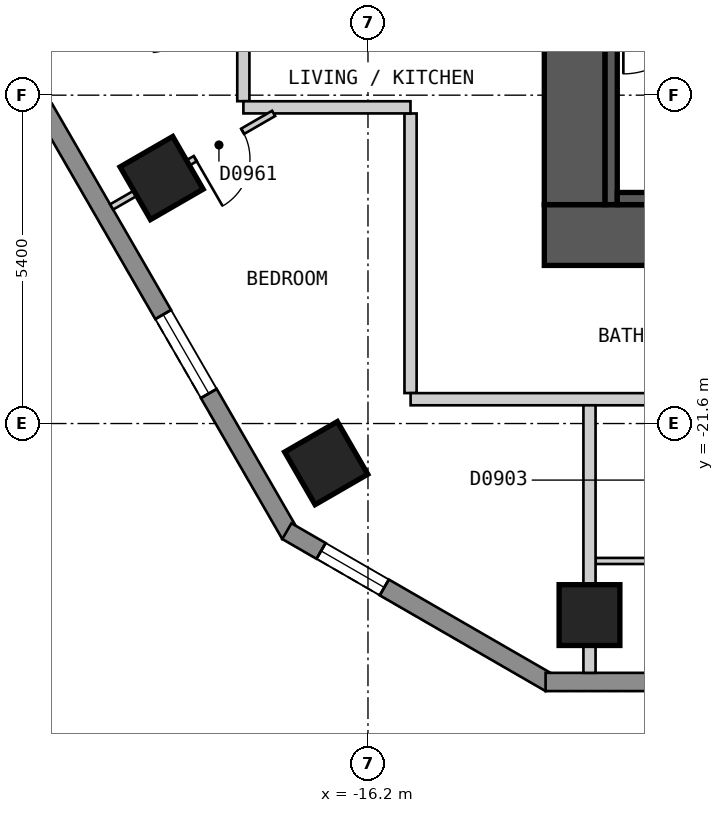
"""IFC4 building model, lengths in metres.
Left out: names, types, materials, properties, quantities, classifications, styles, units other than length and angle.
Written with IfcOpenShell. Run it as: python <this file> out.ifc"""

import sys

from ifc_helpers import new_model, si_unit, direction, frame, frame_2d, origin, origin_2d, place, context, subcontext, project, spatial, polyline, rectangle, outline, extrude, element, fill, save


model = new_model("IFC4")
c1 = context("Model", 3, precision=1e-05, world=origin(), true_north=direction((0.0, 1.0)))
c2 = subcontext(c1, "Body", "Model", "MODEL_VIEW")
j1 = project(units=[si_unit("LENGTHUNIT", "METRE"), si_unit("PLANEANGLEUNIT", "RADIAN")], contexts=[c1])
p1 = place(None, origin())
s1 = spatial("IfcSite", under=j1, at=p1, CompositionType="ELEMENT")
p2 = place(p1, origin())
s2 = spatial("IfcBuilding", under=s1, at=p2, CompositionType="ELEMENT")
p3 = place(p2, frame((0.0, 0.0, 102.0)))
s3 = spatial("IfcBuildingStorey", under=s2, at=p3, CompositionType="ELEMENT", Elevation=102.0)
for number, where, z_axis, x_axis in (
    (1, (-19.594, -17.563, 0.0), (0.0, 0.0, 1.0), (0.5, -0.866, 0.0)),
    (2, (-16.887, -22.251, 0.0), (0.0, 0.0, 1.0), (0.5, -0.866, 0.0)),
    (3, (-12.557, -24.75, 0.0), (0.0, 0.0, 1.0), (1.0, 0.0, 0.0)),
):
    element("IfcColumn", number, at=place(p3, frame(where, z_axis=z_axis, x_axis=x_axis)), inside=s3, PredefinedType="COLUMN", context=c2, shape_type="SweptSolid", body=[
        extrude(rectangle(XDim=1.0, YDim=1.0, at=origin_2d()), origin(), (0.0, 0.0, 1.0), 3.0),
    ])
p4 = place(p3, frame((-13.3, -18.5, 0.0), z_axis=(0.0, 0.0, 1.0), x_axis=(1.0, 0.0, 0.0)))
e4 = element("IfcWall", 4, at=p4, inside=s3, PredefinedType="SHEAR", context=c2, shape_type="SweptSolid", body=[
    extrude(rectangle(XDim=26.6, YDim=1.0, at=frame_2d((13.3, 0.0))), origin(), (0.0, 0.0, 1.0), 2.7),
])
p5 = place(p3, frame((-12.8, -18.0, 0.0), z_axis=(0.0, 0.0, 1.0), x_axis=(0.0, 1.0, 0.0)))
e5 = element("IfcWall", 5, at=p5, inside=s3, PredefinedType="SHEAR", context=c2, shape_type="SweptSolid", body=[
    extrude(rectangle(XDim=12.0, YDim=1.0, at=frame_2d((6.0, 0.0))), origin(), (0.0, 0.0, 1.0), 2.7),
])
p6 = place(p5, frame((3.8, 0.0, 0.0)))
e6 = element("IfcOpeningElement", 6, at=p6, cuts=e5, PredefinedType="OPENING", context=c2, shape_type="SweptSolid", body=[
    extrude(rectangle(XDim=1.2, YDim=2.1, at=frame_2d((0.6, 1.05))), frame((0.0, 0.51, 0.0), z_axis=(0.0, -1.0, 0.0), x_axis=(1.0, 0.0, 0.0)), (0.0, 0.0, 1.0), 1.02),
])
p7 = place(p3, frame((-29.027, -3.425, 0.0), z_axis=(0.0, 0.0, 1.0), x_axis=(0.500035407905, -0.866004960056, 0.0)))
e7 = element("IfcWall", 7, at=p7, inside=s3, PredefinedType="SOLIDWALL", context=c2, shape_type="SweptSolid", body=[
    extrude(outline(polyline([(0.0, -0.15), (23.094, -0.15), (23.014, 0.15), (0.08, 0.15), (0.0, -0.15)])), origin(), (0.0, 0.0, 1.0), 2.7),
])
p8 = place(p7, frame((2.677, 0.0, 0.15)))
e8 = element("IfcOpeningElement", 8, at=p8, cuts=e7, PredefinedType="OPENING", context=c2, shape_type="SweptSolid", body=[
    extrude(rectangle(XDim=1.5, YDim=2.1, at=frame_2d((0.75, 1.05))), frame((0.0, 0.16, 0.0), z_axis=(0.0, -1.0, 0.0), x_axis=(1.0, 0.0, 0.0)), (0.0, 0.0, 1.0), 0.32),
])
p9 = place(p7, frame((8.091, 0.0, 0.15)))
e9 = element("IfcOpeningElement", 9, at=p9, cuts=e7, PredefinedType="OPENING", context=c2, shape_type="SweptSolid", body=[
    extrude(rectangle(XDim=1.5, YDim=2.1, at=frame_2d((0.75, 1.05))), frame((0.0, 0.16, 0.0), z_axis=(0.0, -1.0, 0.0), x_axis=(1.0, 0.0, 0.0)), (0.0, 0.0, 1.0), 0.32),
])
p10 = place(p7, frame((13.504, 0.0, 0.15)))
e10 = element("IfcOpeningElement", 10, at=p10, cuts=e7, PredefinedType="OPENING", context=c2, shape_type="SweptSolid", body=[
    extrude(rectangle(XDim=1.5, YDim=2.1, at=frame_2d((0.75, 1.05))), frame((0.0, 0.16, 0.0), z_axis=(0.0, -1.0, 0.0), x_axis=(1.0, 0.0, 0.0)), (0.0, 0.0, 1.0), 0.32),
])
p11 = place(p7, frame((18.917, 0.0, 0.15)))
e11 = element("IfcOpeningElement", 11, at=p11, cuts=e7, PredefinedType="OPENING", context=c2, shape_type="SweptSolid", body=[
    extrude(rectangle(XDim=1.5, YDim=2.1, at=frame_2d((0.75, 1.05))), frame((0.0, 0.16, 0.0), z_axis=(0.0, -1.0, 0.0), x_axis=(1.0, 0.0, 0.0)), (0.0, 0.0, 1.0), 0.32),
])
p12 = place(p3, frame((-17.534, -23.37, 0.0), z_axis=(0.0, 0.0, 1.0), x_axis=(0.866010750942, -0.50002537861, 0.0)))
e12 = element("IfcWall", 12, at=p12, inside=s3, PredefinedType="SOLIDWALL", context=c2, shape_type="SweptSolid", body=[
    extrude(outline(polyline([(0.0, -0.15), (5.0, -0.15), (4.919, 0.15), (0.08, 0.15), (0.0, -0.15)])), origin(), (0.0, 0.0, 1.0), 2.7),
])
p13 = place(p12, frame((0.65, 0.0, 0.15)))
e13 = element("IfcOpeningElement", 13, at=p13, cuts=e12, PredefinedType="OPENING", context=c2, shape_type="SweptSolid", body=[
    extrude(rectangle(XDim=1.2, YDim=2.1, at=frame_2d((0.6, 1.05))), frame((0.0, 0.16, 0.0), z_axis=(0.0, -1.0, 0.0), x_axis=(1.0, 0.0, 0.0)), (0.0, 0.0, 1.0), 0.32),
])
p14 = place(p3, frame((-13.279, -25.85, 0.0), z_axis=(0.0, 0.0, 1.0), x_axis=(1.0, 0.0, 0.0)))
e14 = element("IfcWall", 14, at=p14, inside=s3, PredefinedType="SOLIDWALL", context=c2, shape_type="SweptSolid", body=[
    extrude(outline(polyline([(0.0, -0.15), (26.558, -0.15), (26.478, 0.15), (0.08, 0.15), (0.0, -0.15)])), origin(), (0.0, 0.0, 1.0), 2.7),
])
p15 = place(p14, frame((2.483, 0.0, 0.15)))
e15 = element("IfcOpeningElement", 15, at=p15, cuts=e14, PredefinedType="OPENING", context=c2, shape_type="SweptSolid", body=[
    extrude(rectangle(XDim=1.5, YDim=2.1, at=frame_2d((0.75, 1.05))), frame((0.0, 0.16, 0.0), z_axis=(0.0, -1.0, 0.0), x_axis=(1.0, 0.0, 0.0)), (0.0, 0.0, 1.0), 0.32),
])
p16 = place(p14, frame((7.507, 0.0, 0.15)))
e16 = element("IfcOpeningElement", 16, at=p16, cuts=e14, PredefinedType="OPENING", context=c2, shape_type="SweptSolid", body=[
    extrude(rectangle(XDim=1.5, YDim=2.1, at=frame_2d((0.75, 1.05))), frame((0.0, 0.16, 0.0), z_axis=(0.0, -1.0, 0.0), x_axis=(1.0, 0.0, 0.0)), (0.0, 0.0, 1.0), 0.32),
])
p17 = place(p14, frame((12.529, 0.0, 0.15)))
e17 = element("IfcOpeningElement", 17, at=p17, cuts=e14, PredefinedType="OPENING", context=c2, shape_type="SweptSolid", body=[
    extrude(rectangle(XDim=1.5, YDim=2.1, at=frame_2d((0.75, 1.05))), frame((0.0, 0.16, 0.0), z_axis=(0.0, -1.0, 0.0), x_axis=(1.0, 0.0, 0.0)), (0.0, 0.0, 1.0), 0.32),
])
p18 = place(p14, frame((17.553, 0.0, 0.15)))
e18 = element("IfcOpeningElement", 18, at=p18, cuts=e14, PredefinedType="OPENING", context=c2, shape_type="SweptSolid", body=[
    extrude(rectangle(XDim=1.5, YDim=2.1, at=frame_2d((0.75, 1.05))), frame((0.0, 0.16, 0.0), z_axis=(0.0, -1.0, 0.0), x_axis=(1.0, 0.0, 0.0)), (0.0, 0.0, 1.0), 0.32),
])
p19 = place(p14, frame((22.575, 0.0, 0.15)))
e19 = element("IfcOpeningElement", 19, at=p19, cuts=e14, PredefinedType="OPENING", context=c2, shape_type="SweptSolid", body=[
    extrude(rectangle(XDim=1.5, YDim=2.1, at=frame_2d((0.75, 1.05))), frame((0.0, 0.16, 0.0), z_axis=(0.0, -1.0, 0.0), x_axis=(1.0, 0.0, 0.0)), (0.0, 0.0, 1.0), 0.32),
])
p20 = place(p3, frame((-15.5, -16.501, 0.0), z_axis=(0.0, 0.0, 1.0), x_axis=(0.0, -1.0, 0.0)))
e20 = element("IfcWall", 20, at=p20, inside=s3, PredefinedType="PARTITIONING", context=c2, shape_type="SweptSolid", body=[
    extrude(rectangle(XDim=4.598, YDim=0.2, at=frame_2d((2.299, 0.0))), origin(), (0.0, 0.0, 1.0), 2.7),
])
p21 = place(p3, frame((-18.25, -14.486, 0.0), z_axis=(0.0, 0.0, 1.0), x_axis=(0.0, -1.0, 0.0)))
e21 = element("IfcWall", 21, at=p21, inside=s3, PredefinedType="PARTITIONING", context=c2, shape_type="SweptSolid", body=[
    extrude(rectangle(XDim=1.813, YDim=0.2, at=frame_2d((0.906, 0.0))), origin(), (0.0, 0.0, 1.0), 2.7),
])
p22 = place(p3, frame((-18.249, -16.4, 0.0), z_axis=(0.0, 0.0, 1.0), x_axis=(1.0, 0.0, 0.0)))
e22 = element("IfcWall", 22, at=p22, inside=s3, PredefinedType="PARTITIONING", context=c2, shape_type="SweptSolid", body=[
    extrude(rectangle(XDim=2.748, YDim=0.2, at=frame_2d((1.374, 0.0))), origin(), (0.0, 0.0, 1.0), 2.7),
])
p23 = place(p3, frame((-15.499, -21.2, 0.0), z_axis=(0.0, 0.0, 1.0), x_axis=(1.0, 0.0, 0.0)))
e23 = element("IfcWall", 23, at=p23, inside=s3, PredefinedType="PARTITIONING", context=c2, shape_type="SweptSolid", body=[
    extrude(rectangle(XDim=30.898, YDim=0.2, at=frame_2d((15.449, 0.0))), origin(), (0.0, 0.0, 1.0), 2.7),
])
p24 = place(p23, frame((4.954, 0.0, 0.0)))
e24 = element("IfcOpeningElement", 24, at=p24, cuts=e23, PredefinedType="OPENING", context=c2, shape_type="SweptSolid", body=[
    extrude(rectangle(XDim=1.0, YDim=2.1, at=frame_2d((0.5, 1.05))), frame((0.0, 0.11, 0.0), z_axis=(0.0, -1.0, 0.0), x_axis=(1.0, 0.0, 0.0)), (0.0, 0.0, 1.0), 0.22),
])
p25 = place(p23, frame((25.046, 0.0, 0.0)))
e25 = element("IfcOpeningElement", 25, at=p25, cuts=e23, PredefinedType="OPENING", context=c2, shape_type="SweptSolid", body=[
    extrude(rectangle(XDim=1.0, YDim=2.1, at=frame_2d((0.5, 1.05))), frame((0.0, 0.11, 0.0), z_axis=(0.0, -1.0, 0.0), x_axis=(1.0, 0.0, 0.0)), (0.0, 0.0, 1.0), 0.22),
])
p26 = place(p3, frame((-12.457, -23.86, 0.0), z_axis=(0.0, 0.0, 1.0), x_axis=(1.0, 0.0, 0.0)))
e26 = element("IfcWall", 26, at=p26, inside=s3, PredefinedType="PARTITIONING", context=c2, shape_type="SweptSolid", body=[
    extrude(rectangle(XDim=3.114, YDim=0.1, at=frame_2d((1.557, 0.0))), origin(), (0.0, 0.0, 1.0), 2.7),
])
p27 = place(p3, frame((-20.416, -18.038, 0.0), z_axis=(0.0, 0.0, 1.0), x_axis=(0.866026989333, 0.499997253739, 0.0)))
e27 = element("IfcWall", 27, at=p27, inside=s3, PredefinedType="PARTITIONING", context=c2, shape_type="SweptSolid", body=[
    extrude(rectangle(XDim=3.076, YDim=0.1, at=frame_2d((1.538, 0.0))), origin(), (0.0, 0.0, 1.0), 2.7),
])
p28 = place(p27, frame((1.588, 0.0, 0.0)))
e28 = element("IfcOpeningElement", 28, at=p28, cuts=e27, PredefinedType="OPENING", context=c2, shape_type="SweptSolid", body=[
    extrude(rectangle(XDim=0.9, YDim=2.1, at=frame_2d((0.45, 1.05))), frame((0.0, 0.06, 0.0), z_axis=(0.0, -1.0, 0.0), x_axis=(1.0, 0.0, 0.0)), (0.0, 0.0, 1.0), 0.12),
])
p29 = place(p3, frame((-12.557, -25.7, 0.0), z_axis=(0.0, 0.0, 1.0), x_axis=(0.0, 1.0, 0.0)))
e29 = element("IfcWall", 29, at=p29, inside=s3, PredefinedType="PARTITIONING", context=c2, shape_type="SweptSolid", body=[
    extrude(rectangle(XDim=4.4, YDim=0.2, at=frame_2d((2.2, 0.0))), origin(), (0.0, 0.0, 1.0), 2.7),
])
p30 = place(p3, frame((-12.2, -18.0, 0.0), z_axis=(0.0, 0.0, 1.0), x_axis=(0.0, 1.0, 0.0)))
e30 = element("IfcWall", 30, at=p30, inside=s3, PredefinedType="SOLIDWALL", context=c2, shape_type="SweptSolid", body=[
    extrude(rectangle(XDim=3.15, YDim=0.2, at=frame_2d((1.575, 0.0))), origin(), (0.0, 0.0, 1.0), 2.7),
])
p31 = place(p3, frame((-12.1, -17.9, 0.0), z_axis=(0.0, 0.0, 1.0), x_axis=(1.0, 0.0, 0.0)))
e31 = element("IfcWall", 31, at=p31, inside=s3, PredefinedType="SOLIDWALL", context=c2, shape_type="SweptSolid", body=[
    extrude(rectangle(XDim=5.4, YDim=0.2, at=frame_2d((2.7, 0.0))), origin(), (0.0, 0.0, 1.0), 2.7),
])
p32 = place(p11, origin())
e32 = element("IfcWindow", 32, at=p32, inside=s3, PartitioningType="SINGLE_PANEL", PredefinedType="WINDOW", context=c2, shape_type="SweptSolid", body=[
    extrude(rectangle(XDim=1.5, YDim=2.1, at=frame_2d((0.75, 1.05))), frame((0.0, 0.03, 0.0), z_axis=(0.0, -1.0, 0.0), x_axis=(1.0, 0.0, 0.0)), (0.0, 0.0, 1.0), 0.06),
])
fill(e11, e32)
p33 = place(p13, origin())
e33 = element("IfcWindow", 33, at=p33, inside=s3, PartitioningType="SINGLE_PANEL", PredefinedType="WINDOW", context=c2, shape_type="SweptSolid", body=[
    extrude(rectangle(XDim=1.2, YDim=2.1, at=frame_2d((0.6, 1.05))), frame((0.0, 0.03, 0.0), z_axis=(0.0, -1.0, 0.0), x_axis=(1.0, 0.0, 0.0)), (0.0, 0.0, 1.0), 0.06),
])
fill(e13, e33)
p34 = place(p28, origin())
e34 = element("IfcDoor", 34, at=p34, inside=s3, OperationType="SINGLE_SWING_LEFT", PredefinedType="DOOR", context=c2, shape_type="SweptSolid", body=[
    extrude(rectangle(XDim=0.9, YDim=2.1, at=frame_2d((0.45, 1.05))), frame((0.0, 0.025, 0.0), z_axis=(0.0, -1.0, 0.0), x_axis=(1.0, 0.0, 0.0)), (0.0, 0.0, 1.0), 0.05),
])
fill(e28, e34)
save(model, sys.argv[1])
